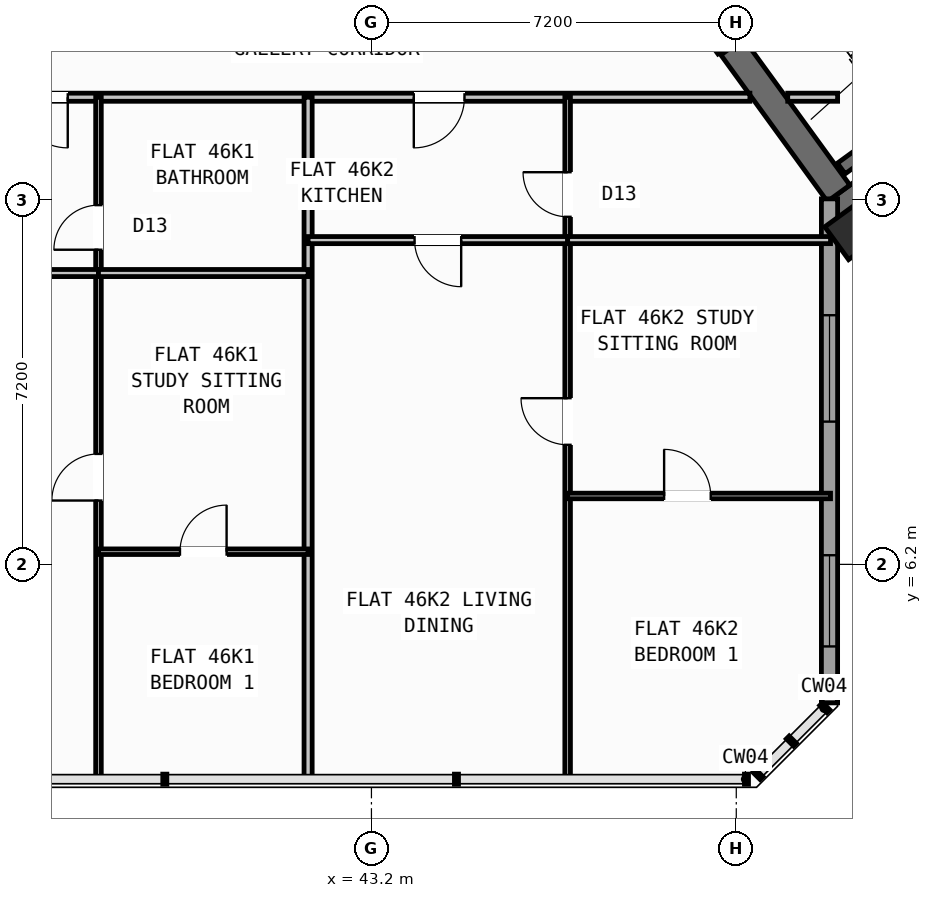
"""IFC4 building model, lengths in metres.
Left out: names, types, materials, properties, quantities, classifications, styles, units other than length and angle.
Written with IfcOpenShell. Run it as: python <this file> out.ifc"""

import sys

from ifc_helpers import new_model, si_unit, direction, frame, frame_2d, origin, origin_2d, place, context, subcontext, project, spatial, rectangle, hollow_rectangle, extrude, source, transform, mapped, element, fill, save


model = new_model("IFC4")
c1 = context("Model", 3, precision=1e-05, world=origin(), true_north=direction((0.0, 1.0)))
c2 = subcontext(c1, "Body", "Model", "MODEL_VIEW")
j1 = project(units=[si_unit("LENGTHUNIT", "METRE"), si_unit("PLANEANGLEUNIT", "RADIAN")], contexts=[c1])
p1 = place(None, origin())
s1 = spatial("IfcSite", under=j1, at=p1, CompositionType="ELEMENT")
p2 = place(p1, origin())
s2 = spatial("IfcBuilding", under=s1, at=p2, CompositionType="ELEMENT")
p3 = place(p2, frame((0.0, 0.0, 184.2)))
s3 = spatial("IfcBuildingStorey", under=s2, at=p3, CompositionType="ELEMENT", Elevation=184.2)
p4 = place(p3, frame((36.683, 18.304, 0.0), z_axis=(0.0, 0.0, 1.0), x_axis=(-0.529896466841, -0.848062341122, 0.0)))
e1 = element("IfcWall", 1, at=p4, inside=s3, PredefinedType="SHEAR", context=c2, shape_type="SweptSolid", body=[
    extrude(rectangle(XDim=6.425, YDim=0.55, at=frame_2d((3.212, 0.0))), origin(), (0.0, 0.0, 1.0), 3.35),
])
p5 = place(p3, frame((52.359, 13.14, 0.0), z_axis=(0.0, 0.0, 1.0), x_axis=(0.809014896919, 0.587788139183, 0.0)))
e2 = element("IfcWall", 2, at=p5, inside=s3, PredefinedType="SHEAR", context=c2, shape_type="SweptSolid", body=[
    extrude(rectangle(XDim=12.34, YDim=0.55, at=frame_2d((6.17, 0.0))), origin(), (0.0, 0.0, 1.0), 3.35),
])
p6 = place(p3, frame((52.42, 13.524, 0.0), z_axis=(0.0, 0.0, 1.0), x_axis=(-0.587802113096, 0.809004744015, 0.0)))
e3 = element("IfcWall", 3, at=p6, inside=s3, PredefinedType="SHEAR", context=c2, shape_type="SweptSolid", body=[
    extrude(rectangle(XDim=3.575, YDim=0.55, at=frame_2d((1.788, 0.0))), origin(), (0.0, 0.0, 1.0), 3.35),
])
m1 = source(origin(), c2, "Body", "SweptSolid", [
    extrude(hollow_rectangle(XDim=0.8, YDim=0.8, WallThickness=0.032, at=origin_2d()), origin(), (0.0, 0.0, 1.0), 3.6),
])
p7 = place(p3, frame((52.705, 12.773, 0.0), z_axis=(0.0, 0.0, 1.0), x_axis=(0.809016994375, 0.587785252292, 0.0)))
e4 = element("IfcColumn", 4, at=p7, inside=s3, PredefinedType="COLUMN", context=c2, shape_type="MappedRepresentation", body=[
    mapped(m1, transform((0.0, 0.0, 0.0), scale=1.0)),
])
p8 = place(p3, frame((52.24, 13.414, 0.0), z_axis=(0.0, 0.0, 1.0), x_axis=(0.0, -1.0, 0.0)))
e5 = element("IfcWall", 5, at=p8, inside=s3, PredefinedType="STANDARD", context=c2, shape_type="SweptSolid", body=[
    extrude(rectangle(XDim=9.948, YDim=0.32, at=frame_2d((4.974, 0.0))), origin(), (0.0, 0.0, 1.0), 3.35),
])
p9 = place(p8, frame((2.296, 0.0, 0.8)))
e6 = element("IfcOpeningElement", 6, at=p9, cuts=e5, PredefinedType="OPENING", context=c2, shape_type="SweptSolid", body=[
    extrude(rectangle(XDim=2.1, YDim=1.55, at=frame_2d((1.05, 0.775))), frame((0.0, 0.17, 0.0), z_axis=(0.0, -1.0, 0.0), x_axis=(1.0, 0.0, 0.0)), (0.0, 0.0, 1.0), 0.34),
])
p10 = place(p8, frame((7.033, 0.0, 0.85)))
e7 = element("IfcOpeningElement", 7, at=p10, cuts=e5, PredefinedType="OPENING", context=c2, shape_type="SweptSolid", body=[
    extrude(rectangle(XDim=1.8, YDim=1.5, at=frame_2d((0.9, 0.75))), frame((0.0, 0.17, 0.0), z_axis=(0.0, -1.0, 0.0), x_axis=(1.0, 0.0, 0.0)), (0.0, 0.0, 1.0), 0.34),
])
p11 = place(p3, frame((52.472, 14.013, 0.0), z_axis=(0.0, 0.0, 1.0), x_axis=(0.809028366311, 0.587769599847, 0.0)))
e8 = element("IfcWall", 8, at=p11, inside=s3, PredefinedType="SHEAR", context=c2, shape_type="SweptSolid", body=[
    extrude(rectangle(XDim=7.33, YDim=0.26, at=frame_2d((3.665, 0.0))), origin(), (0.0, 0.0, 1.0), 3.35),
])
p12 = place(p3, frame((35.237, 15.42, 0.0), z_axis=(0.0, 0.0, 1.0), x_axis=(1.0, 0.0, 0.0)))
e9 = element("IfcWall", 9, at=p12, inside=s3, PredefinedType="PARTITIONING", context=c2, shape_type="SweptSolid", body=[
    extrude(rectangle(XDim=15.432, YDim=0.16, at=frame_2d((7.716, 0.0))), origin(), (0.0, 0.0, 1.0), 3.34),
])
p13 = place(p12, frame((0.969, 0.0, 0.0)))
e10 = element("IfcOpeningElement", 10, at=p13, cuts=e9, PredefinedType="OPENING", context=c2, shape_type="SweptSolid", body=[
    extrude(rectangle(XDim=1.0, YDim=2.1, at=frame_2d((0.5, 1.05))), frame((0.0, 0.09, 0.0), z_axis=(0.0, -1.0, 0.0), x_axis=(1.0, 0.0, 0.0)), (0.0, 0.0, 1.0), 0.18),
])
p14 = place(p12, frame((8.799, 0.0, 0.0)))
e11 = element("IfcOpeningElement", 11, at=p14, cuts=e9, PredefinedType="OPENING", context=c2, shape_type="SweptSolid", body=[
    extrude(rectangle(XDim=1.0, YDim=2.1, at=frame_2d((0.5, 1.05))), frame((0.0, 0.09, 0.0), z_axis=(0.0, -1.0, 0.0), x_axis=(1.0, 0.0, 0.0)), (0.0, 0.0, 1.0), 0.18),
])
p15 = place(p3, frame((51.416, 15.42, 0.0), z_axis=(0.0, 0.0, 1.0), x_axis=(1.0, 0.0, 0.0)))
e12 = element("IfcWall", 12, at=p15, inside=s3, PredefinedType="PARTITIONING", context=c2, shape_type="SweptSolid", body=[
    extrude(rectangle(XDim=0.984, YDim=0.16, at=frame_2d((0.492, 0.0))), origin(), (0.0, 0.0, 1.0), 3.34),
])
p16 = place(p3, frame((50.119, 16.333, 0.0), z_axis=(0.0, 0.0, 1.0), x_axis=(-0.587749856981, 0.809042709391, 0.0)))
e13 = element("IfcWall", 13, at=p16, inside=s3, PredefinedType="STANDARD", context=c2, shape_type="SweptSolid", body=[
    extrude(rectangle(XDim=2.96, YDim=0.2, at=frame_2d((1.48, 0.0))), origin(), (0.0, 0.0, 1.0), 3.34),
])
p17 = place(p16, frame((0.53, 0.0, 0.0)))
e14 = element("IfcOpeningElement", 14, at=p17, cuts=e13, PredefinedType="OPENING", context=c2, shape_type="SweptSolid", body=[
    extrude(rectangle(XDim=1.5, YDim=2.15, at=frame_2d((0.75, 1.075))), frame((0.0, 0.11, 0.0), z_axis=(0.0, -1.0, 0.0), x_axis=(1.0, 0.0, 0.0)), (0.0, 0.0, 1.0), 0.22),
])
p18 = place(p3, frame((41.95, 1.96, 0.0), z_axis=(0.0, 0.0, 1.0), x_axis=(0.0, 1.0, 0.0)))
e15 = element("IfcWall", 15, at=p18, inside=s3, PredefinedType="PARTITIONING", context=c2, shape_type="SweptSolid", body=[
    extrude(rectangle(XDim=13.46, YDim=0.16, at=frame_2d((6.73, 0.0))), origin(), (0.0, 0.0, 1.0), 3.34),
])
p19 = place(p3, frame((37.813, 1.96, 0.0), z_axis=(0.0, 0.0, 1.0), x_axis=(0.0, 1.0, 0.0)))
e16 = element("IfcWall", 16, at=p19, inside=s3, PredefinedType="PARTITIONING", context=c2, shape_type="SweptSolid", body=[
    extrude(rectangle(XDim=13.46, YDim=0.11, at=frame_2d((6.73, 0.0))), origin(), (0.0, 0.0, 1.0), 3.34),
])
p20 = place(p19, frame((5.5, 0.0, 0.0)))
e17 = element("IfcOpeningElement", 17, at=p20, cuts=e16, PredefinedType="OPENING", context=c2, shape_type="SweptSolid", body=[
    extrude(rectangle(XDim=0.92, YDim=2.08, at=frame_2d((0.46, 1.04))), frame((0.0, 0.065, 0.0), z_axis=(0.0, -1.0, 0.0), x_axis=(1.0, 0.0, 0.0)), (0.0, 0.0, 1.0), 0.13),
])
p21 = place(p19, frame((10.45, 0.0, 0.0)))
e18 = element("IfcOpeningElement", 18, at=p21, cuts=e16, PredefinedType="OPENING", context=c2, shape_type="SweptSolid", body=[
    extrude(rectangle(XDim=0.88, YDim=2.08, at=frame_2d((0.44, 1.04))), frame((0.0, 0.065, 0.0), z_axis=(0.0, -1.0, 0.0), x_axis=(1.0, 0.0, 0.0)), (0.0, 0.0, 1.0), 0.13),
])
p22 = place(p3, frame((33.447, 11.95, 0.0), z_axis=(0.0, 0.0, 1.0), x_axis=(1.0, 0.0, 0.0)))
e19 = element("IfcWall", 19, at=p22, inside=s3, PredefinedType="PLUMBINGWALL", context=c2, shape_type="SweptSolid", body=[
    extrude(rectangle(XDim=4.366, YDim=0.14, at=frame_2d((2.183, 0.0))), origin(), (0.0, 0.0, 1.0), 2.525),
])
p23 = place(p22, frame((1.05, 0.0, 0.0)))
e20 = element("IfcOpeningElement", 20, at=p23, cuts=e19, PredefinedType="OPENING", context=c2, shape_type="SweptSolid", body=[
    extrude(rectangle(XDim=0.92, YDim=2.08, at=frame_2d((0.46, 1.04))), frame((0.0, 0.08, 0.0), z_axis=(0.0, -1.0, 0.0), x_axis=(1.0, 0.0, 0.0)), (0.0, 0.0, 1.0), 0.16),
])
p24 = place(p3, frame((37.813, 11.95, 0.0), z_axis=(0.0, 0.0, 1.0), x_axis=(1.0, 0.0, 0.0)))
e21 = element("IfcWall", 21, at=p24, inside=s3, PredefinedType="PLUMBINGWALL", context=c2, shape_type="SweptSolid", body=[
    extrude(rectangle(XDim=4.137, YDim=0.14, at=frame_2d((2.068, 0.0))), origin(), (0.0, 0.0, 1.0), 2.525),
])
p25 = place(p3, frame((37.813, 6.45, 0.0), z_axis=(0.0, 0.0, 1.0), x_axis=(1.0, 0.0, 0.0)))
e22 = element("IfcWall", 22, at=p25, inside=s3, PredefinedType="PARTITIONING", context=c2, shape_type="SweptSolid", body=[
    extrude(rectangle(XDim=4.137, YDim=0.11, at=frame_2d((2.068, 0.0))), origin(), (0.0, 0.0, 1.0), 3.34),
])
p26 = place(p25, frame((1.608, 0.0, 0.0)))
e23 = element("IfcOpeningElement", 23, at=p26, cuts=e22, PredefinedType="OPENING", context=c2, shape_type="SweptSolid", body=[
    extrude(rectangle(XDim=0.92, YDim=2.08, at=frame_2d((0.46, 1.04))), frame((0.0, 0.065, 0.0), z_axis=(0.0, -1.0, 0.0), x_axis=(1.0, 0.0, 0.0)), (0.0, 0.0, 1.0), 0.13),
])
p27 = place(p3, frame((47.072, 1.96, 0.0), z_axis=(0.0, 0.0, 1.0), x_axis=(0.0, 1.0, 0.0)))
e24 = element("IfcWall", 24, at=p27, inside=s3, PredefinedType="PARTITIONING", context=c2, shape_type="SweptSolid", body=[
    extrude(rectangle(XDim=13.46, YDim=0.11, at=frame_2d((6.73, 0.0))), origin(), (0.0, 0.0, 1.0), 3.34),
])
p28 = place(p27, frame((6.6, 0.0, 0.0)))
e25 = element("IfcOpeningElement", 25, at=p28, cuts=e24, PredefinedType="OPENING", context=c2, shape_type="SweptSolid", body=[
    extrude(rectangle(XDim=0.92, YDim=2.08, at=frame_2d((0.46, 1.04))), frame((0.0, 0.065, 0.0), z_axis=(0.0, -1.0, 0.0), x_axis=(1.0, 0.0, 0.0)), (0.0, 0.0, 1.0), 0.13),
])
p29 = place(p27, frame((11.1, 0.0, 0.0)))
e26 = element("IfcOpeningElement", 26, at=p29, cuts=e24, PredefinedType="OPENING", context=c2, shape_type="SweptSolid", body=[
    extrude(rectangle(XDim=0.88, YDim=2.08, at=frame_2d((0.44, 1.04))), frame((0.0, 0.065, 0.0), z_axis=(0.0, -1.0, 0.0), x_axis=(1.0, 0.0, 0.0)), (0.0, 0.0, 1.0), 0.13),
])
p30 = place(p3, frame((41.95, 12.6, 0.0), z_axis=(0.0, 0.0, 1.0), x_axis=(1.0, 0.0, 0.0)))
e27 = element("IfcWall", 27, at=p30, inside=s3, PredefinedType="PLUMBINGWALL", context=c2, shape_type="SweptSolid", body=[
    extrude(rectangle(XDim=5.122, YDim=0.14, at=frame_2d((2.561, 0.0))), origin(), (0.0, 0.0, 1.0), 2.525),
])
p31 = place(p30, frame((2.101, 0.0, 0.0)))
e28 = element("IfcOpeningElement", 28, at=p31, cuts=e27, PredefinedType="OPENING", context=c2, shape_type="SweptSolid", body=[
    extrude(rectangle(XDim=0.92, YDim=2.08, at=frame_2d((0.46, 1.04))), frame((0.0, 0.08, 0.0), z_axis=(0.0, -1.0, 0.0), x_axis=(1.0, 0.0, 0.0)), (0.0, 0.0, 1.0), 0.16),
])
p32 = place(p3, frame((47.072, 12.6, 0.0), z_axis=(0.0, 0.0, 1.0), x_axis=(1.0, 0.0, 0.0)))
e29 = element("IfcWall", 29, at=p32, inside=s3, PredefinedType="PLUMBINGWALL", context=c2, shape_type="SweptSolid", body=[
    extrude(rectangle(XDim=5.188, YDim=0.14, at=frame_2d((2.594, 0.0))), origin(), (0.0, 0.0, 1.0), 2.525),
])
p33 = place(p3, frame((47.072, 7.55, 0.0), z_axis=(0.0, 0.0, 1.0), x_axis=(1.0, 0.0, 0.0)))
e30 = element("IfcWall", 30, at=p33, inside=s3, PredefinedType="PARTITIONING", context=c2, shape_type="SweptSolid", body=[
    extrude(rectangle(XDim=5.188, YDim=0.11, at=frame_2d((2.594, 0.0))), origin(), (0.0, 0.0, 1.0), 3.34),
])
p34 = place(p33, frame((1.904, 0.0, 0.0)))
e31 = element("IfcOpeningElement", 31, at=p34, cuts=e30, PredefinedType="OPENING", context=c2, shape_type="SweptSolid", body=[
    extrude(rectangle(XDim=0.92, YDim=2.08, at=frame_2d((0.46, 1.04))), frame((0.0, 0.065, 0.0), z_axis=(0.0, -1.0, 0.0), x_axis=(1.0, 0.0, 0.0)), (0.0, 0.0, 1.0), 0.13),
])
m2 = source(origin(), c2, "Body", "SweptSolid", [
    extrude(rectangle(XDim=2.1, YDim=1.55, at=frame_2d((1.05, 0.775))), frame((0.0, 0.03, 0.0), z_axis=(0.0, -1.0, 0.0), x_axis=(1.0, 0.0, 0.0)), (0.0, 0.0, 1.0), 0.06),
])
p35 = place(p9, origin())
e32 = element("IfcWindow", 32, at=p35, inside=s3, PartitioningType="SINGLE_PANEL", PredefinedType="WINDOW", context=c2, shape_type="MappedRepresentation", body=[
    mapped(m2, transform((0.0, 0.0, 0.0), scale=1.0)),
])
fill(e6, e32)
m3 = source(origin(), c2, "Body", "SweptSolid", [
    extrude(rectangle(XDim=1.8, YDim=1.5, at=frame_2d((0.9, 0.75))), frame((0.0, 0.03, 0.0), z_axis=(0.0, -1.0, 0.0), x_axis=(1.0, 0.0, 0.0)), (0.0, 0.0, 1.0), 0.06),
])
p36 = place(p10, origin())
e33 = element("IfcWindow", 33, at=p36, inside=s3, PartitioningType="SINGLE_PANEL", PredefinedType="WINDOW", context=c2, shape_type="MappedRepresentation", body=[
    mapped(m3, transform((0.0, 0.0, 0.0), scale=1.0)),
])
fill(e7, e33)
m4 = source(origin(), c2, "Body", "SweptSolid", [
    extrude(rectangle(XDim=0.92, YDim=2.08, at=frame_2d((0.46, 1.04))), frame((0.0, 0.025, 0.0), z_axis=(0.0, -1.0, 0.0), x_axis=(1.0, 0.0, 0.0)), (0.0, 0.0, 1.0), 0.05),
])
p37 = place(p20, origin())
e34 = element("IfcDoor", 34, at=p37, inside=s3, OperationType="SINGLE_SWING_LEFT", PredefinedType="DOOR", context=c2, shape_type="MappedRepresentation", body=[
    mapped(m4, transform((0.0, 0.0, 0.0), scale=1.0)),
])
fill(e17, e34)
p38 = place(p26, origin())
e35 = element("IfcDoor", 35, at=p38, inside=s3, OperationType="SINGLE_SWING_RIGHT", PredefinedType="DOOR", context=c2, shape_type="MappedRepresentation", body=[
    mapped(m4, transform((0.0, 0.0, 0.0), scale=1.0)),
])
fill(e23, e35)
m5 = source(origin(), c2, "Body", "SweptSolid", [
    extrude(rectangle(XDim=1.0, YDim=2.1, at=frame_2d((0.5, 1.05))), frame((0.0, 0.025, 0.0), z_axis=(0.0, -1.0, 0.0), x_axis=(1.0, 0.0, 0.0)), (0.0, 0.0, 1.0), 0.05),
])
p39 = place(p13, frame((1.0, 0.0, 0.0), z_axis=(0.0, 0.0, 1.0), x_axis=(-1.0, 0.0, 0.0)))
e36 = element("IfcDoor", 36, at=p39, inside=s3, OperationType="SINGLE_SWING_LEFT", PredefinedType="DOOR", context=c2, shape_type="MappedRepresentation", body=[
    mapped(m5, transform((0.0, 0.0, 0.0), scale=1.0)),
])
fill(e10, e36)
m6 = source(origin(), c2, "Body", "SweptSolid", [
    extrude(rectangle(XDim=0.88, YDim=2.08, at=frame_2d((0.44, 1.04))), frame((0.0, 0.025, 0.0), z_axis=(0.0, -1.0, 0.0), x_axis=(1.0, 0.0, 0.0)), (0.0, 0.0, 1.0), 0.05),
])
p40 = place(p21, origin())
e37 = element("IfcDoor", 37, at=p40, inside=s3, OperationType="SINGLE_SWING_LEFT", PredefinedType="DOOR", context=c2, shape_type="MappedRepresentation", body=[
    mapped(m6, transform((0.0, 0.0, 0.0), scale=1.0)),
])
fill(e18, e37)
p41 = place(p28, origin())
e38 = element("IfcDoor", 38, at=p41, inside=s3, OperationType="SINGLE_SWING_RIGHT", PredefinedType="DOOR", context=c2, shape_type="MappedRepresentation", body=[
    mapped(m4, transform((0.0, 0.0, 0.0), scale=1.0)),
])
fill(e25, e38)
p42 = place(p34, origin())
e39 = element("IfcDoor", 39, at=p42, inside=s3, OperationType="SINGLE_SWING_LEFT", PredefinedType="DOOR", context=c2, shape_type="MappedRepresentation", body=[
    mapped(m4, transform((0.0, 0.0, 0.0), scale=1.0)),
])
fill(e31, e39)
p43 = place(p14, frame((1.0, 0.0, 0.0), z_axis=(0.0, 0.0, 1.0), x_axis=(-1.0, 0.0, 0.0)))
e40 = element("IfcDoor", 40, at=p43, inside=s3, OperationType="SINGLE_SWING_RIGHT", PredefinedType="DOOR", context=c2, shape_type="MappedRepresentation", body=[
    mapped(m5, transform((0.0, 0.0, 0.0), scale=1.0)),
])
fill(e11, e40)
p44 = place(p31, frame((0.92, 0.0, 0.0), z_axis=(0.0, 0.0, 1.0), x_axis=(-1.0, 0.0, 0.0)))
e41 = element("IfcDoor", 41, at=p44, inside=s3, OperationType="SINGLE_SWING_LEFT", PredefinedType="DOOR", context=c2, shape_type="MappedRepresentation", body=[
    mapped(m4, transform((0.0, 0.0, 0.0), scale=1.0)),
])
fill(e28, e41)
p45 = place(p29, origin())
e42 = element("IfcDoor", 42, at=p45, inside=s3, OperationType="SINGLE_SWING_RIGHT", PredefinedType="DOOR", context=c2, shape_type="MappedRepresentation", body=[
    mapped(m6, transform((0.0, 0.0, 0.0), scale=1.0)),
])
fill(e26, e42)
save(model, sys.argv[1])
